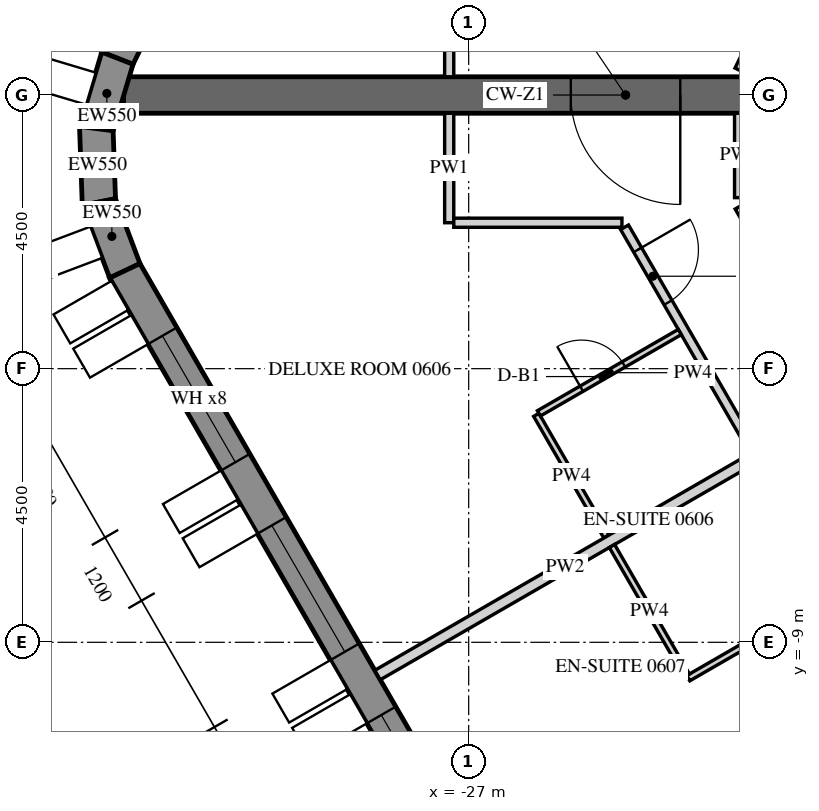
"""IFC4 building model, lengths in metres.
Left out: names, types, materials, properties, quantities, classifications, styles, units other than length and angle.
Written with IfcOpenShell. Run it as: python <this file> out.ifc"""

import sys

from ifc_helpers import new_model, si_unit, direction, frame, frame_2d, origin, place, context, subcontext, project, spatial, polyline, rectangle, outline, extrude, element, fill, save


model = new_model("IFC4")
c1 = context("Model", 3, precision=1e-05, world=origin(), true_north=direction((0.0, 1.0)))
c2 = subcontext(c1, "Body", "Model", "MODEL_VIEW")
j1 = project(units=[si_unit("LENGTHUNIT", "METRE"), si_unit("PLANEANGLEUNIT", "RADIAN")], contexts=[c1])
p1 = place(None, origin())
s1 = spatial("IfcSite", under=j1, at=p1, CompositionType="ELEMENT")
p2 = place(p1, origin())
s2 = spatial("IfcBuilding", under=s1, at=p2, CompositionType="ELEMENT")
p3 = place(p2, frame((0.0, 0.0, 92.1)))
s3 = spatial("IfcBuildingStorey", under=s2, at=p3, CompositionType="ELEMENT", Elevation=92.1)
p4 = place(p3, frame((-19.595, 27.633, -0.15), z_axis=(0.0, 0.0, 1.0), x_axis=(-0.438368285794, -0.898795441694, 0.0)))
e1 = element("IfcWall", 1, at=p4, inside=s3, PredefinedType="SOLIDWALL", context=c2, shape_type="SweptSolid", body=[
    extrude(outline(polyline([(-0.026, -0.275), (30.093, -0.275), (30.048, 0.275), (0.026, 0.275), (-0.026, -0.275)])), origin(), (0.0, 0.0, 1.0), 3.9),
])
p5 = place(p4, frame((1.236, 0.0, 1.05)))
e2 = element("IfcOpeningElement", 2, at=p5, cuts=e1, PredefinedType="OPENING", context=c2, shape_type="SweptSolid", body=[
    extrude(rectangle(XDim=2.4, YDim=2.4, at=frame_2d((1.2, 1.2))), frame((0.0, 0.285, 0.0), z_axis=(0.0, -1.0, 0.0), x_axis=(1.0, 0.0, 0.0)), (0.0, 0.0, 1.0), 0.57),
])
p6 = place(p4, frame((4.835, 0.0, 1.05)))
e3 = element("IfcOpeningElement", 3, at=p6, cuts=e1, PredefinedType="OPENING", context=c2, shape_type="SweptSolid", body=[
    extrude(rectangle(XDim=2.4, YDim=2.4, at=frame_2d((1.2, 1.2))), frame((0.0, 0.285, 0.0), z_axis=(0.0, -1.0, 0.0), x_axis=(1.0, 0.0, 0.0)), (0.0, 0.0, 1.0), 0.57),
])
p7 = place(p4, frame((8.436, 0.0, 1.05)))
e4 = element("IfcOpeningElement", 4, at=p7, cuts=e1, PredefinedType="OPENING", context=c2, shape_type="SweptSolid", body=[
    extrude(rectangle(XDim=2.4, YDim=2.4, at=frame_2d((1.2, 1.2))), frame((0.0, 0.285, 0.0), z_axis=(0.0, -1.0, 0.0), x_axis=(1.0, 0.0, 0.0)), (0.0, 0.0, 1.0), 0.57),
])
p8 = place(p4, frame((12.035, 0.0, 1.05)))
e5 = element("IfcOpeningElement", 5, at=p8, cuts=e1, PredefinedType="OPENING", context=c2, shape_type="SweptSolid", body=[
    extrude(rectangle(XDim=2.4, YDim=2.4, at=frame_2d((1.2, 1.2))), frame((0.0, 0.285, 0.0), z_axis=(0.0, -1.0, 0.0), x_axis=(1.0, 0.0, 0.0)), (0.0, 0.0, 1.0), 0.57),
])
p9 = place(p4, frame((15.635, 0.0, 1.05)))
e6 = element("IfcOpeningElement", 6, at=p9, cuts=e1, PredefinedType="OPENING", context=c2, shape_type="SweptSolid", body=[
    extrude(rectangle(XDim=2.4, YDim=2.4, at=frame_2d((1.2, 1.2))), frame((0.0, 0.285, 0.0), z_axis=(0.0, -1.0, 0.0), x_axis=(1.0, 0.0, 0.0)), (0.0, 0.0, 1.0), 0.57),
])
p10 = place(p4, frame((19.236, 0.0, 1.05)))
e7 = element("IfcOpeningElement", 7, at=p10, cuts=e1, PredefinedType="OPENING", context=c2, shape_type="SweptSolid", body=[
    extrude(rectangle(XDim=2.4, YDim=2.4, at=frame_2d((1.2, 1.2))), frame((0.0, 0.285, 0.0), z_axis=(0.0, -1.0, 0.0), x_axis=(1.0, 0.0, 0.0)), (0.0, 0.0, 1.0), 0.57),
])
p11 = place(p4, frame((22.835, 0.0, 1.05)))
e8 = element("IfcOpeningElement", 8, at=p11, cuts=e1, PredefinedType="OPENING", context=c2, shape_type="SweptSolid", body=[
    extrude(rectangle(XDim=2.4, YDim=2.4, at=frame_2d((1.2, 1.2))), frame((0.0, 0.285, 0.0), z_axis=(0.0, -1.0, 0.0), x_axis=(1.0, 0.0, 0.0)), (0.0, 0.0, 1.0), 0.57),
])
p12 = place(p4, frame((26.436, 0.0, 1.05)))
e9 = element("IfcOpeningElement", 9, at=p12, cuts=e1, PredefinedType="OPENING", context=c2, shape_type="SweptSolid", body=[
    extrude(rectangle(XDim=2.4, YDim=2.4, at=frame_2d((1.2, 1.2))), frame((0.0, 0.285, 0.0), z_axis=(0.0, -1.0, 0.0), x_axis=(1.0, 0.0, 0.0)), (0.0, 0.0, 1.0), 0.57),
])
p13 = place(p3, frame((-32.777, 0.605, -0.15), z_axis=(0.0, 0.0, 1.0), x_axis=(-0.286921497463, -0.957954098219, 0.0)))
e10 = element("IfcWall", 10, at=p13, inside=s3, PredefinedType="SOLIDWALL", context=c2, shape_type="SweptSolid", body=[
    extrude(outline(polyline([(-0.022, -0.275), (1.253, -0.275), (1.163, 0.275), (0.022, 0.275), (-0.022, -0.275)])), origin(), (0.0, 0.0, 1.0), 3.9),
])
p14 = place(p3, frame((-33.124, -0.552, -0.15), z_axis=(0.0, 0.0, 1.0), x_axis=(0.03495638276, -0.999388838893, 0.0)))
e11 = element("IfcWall", 11, at=p14, inside=s3, PredefinedType="SOLIDWALL", context=c2, shape_type="SweptSolid", body=[
    extrude(outline(polyline([(-0.045, -0.275), (1.253, -0.275), (1.163, 0.275), (0.045, 0.275), (-0.045, -0.275)])), origin(), (0.0, 0.0, 1.0), 3.9),
])
p15 = place(p3, frame((-33.081, -1.76, -0.15), z_axis=(0.0, 0.0, 1.0), x_axis=(0.353027214741, -0.935613053378, 0.0)))
e12 = element("IfcWall", 12, at=p15, inside=s3, PredefinedType="SOLIDWALL", context=c2, shape_type="SweptSolid", body=[
    extrude(outline(polyline([(-0.045, -0.275), (1.231, -0.275), (1.186, 0.275), (0.045, 0.275), (-0.045, -0.275)])), origin(), (0.0, 0.0, 1.0), 3.9),
])
p16 = place(p3, frame((-32.655, -2.89, -0.15), z_axis=(0.0, 0.0, 1.0), x_axis=(0.499997711317, -0.866026725152, 0.0)))
e13 = element("IfcWall", 13, at=p16, inside=s3, PredefinedType="SOLIDWALL", context=c2, shape_type="SweptSolid", body=[
    extrude(outline(polyline([(-0.022, -0.275), (30.097, -0.275), (30.045, 0.275), (0.022, 0.275), (-0.022, -0.275)])), origin(), (0.0, 0.0, 1.0), 3.9),
])
p17 = place(p16, frame((1.236, 0.0, 1.05)))
e14 = element("IfcOpeningElement", 14, at=p17, cuts=e13, PredefinedType="OPENING", context=c2, shape_type="SweptSolid", body=[
    extrude(rectangle(XDim=2.4, YDim=2.4, at=frame_2d((1.2, 1.2))), frame((0.0, 0.285, 0.0), z_axis=(0.0, -1.0, 0.0), x_axis=(1.0, 0.0, 0.0)), (0.0, 0.0, 1.0), 0.57),
])
p18 = place(p16, frame((4.835, 0.0, 1.05)))
e15 = element("IfcOpeningElement", 15, at=p18, cuts=e13, PredefinedType="OPENING", context=c2, shape_type="SweptSolid", body=[
    extrude(rectangle(XDim=2.4, YDim=2.4, at=frame_2d((1.2, 1.2))), frame((0.0, 0.285, 0.0), z_axis=(0.0, -1.0, 0.0), x_axis=(1.0, 0.0, 0.0)), (0.0, 0.0, 1.0), 0.57),
])
p19 = place(p16, frame((8.436, 0.0, 1.05)))
e16 = element("IfcOpeningElement", 16, at=p19, cuts=e13, PredefinedType="OPENING", context=c2, shape_type="SweptSolid", body=[
    extrude(rectangle(XDim=2.4, YDim=2.4, at=frame_2d((1.2, 1.2))), frame((0.0, 0.285, 0.0), z_axis=(0.0, -1.0, 0.0), x_axis=(1.0, 0.0, 0.0)), (0.0, 0.0, 1.0), 0.57),
])
p20 = place(p16, frame((12.035, 0.0, 1.05)))
e17 = element("IfcOpeningElement", 17, at=p20, cuts=e13, PredefinedType="OPENING", context=c2, shape_type="SweptSolid", body=[
    extrude(rectangle(XDim=2.4, YDim=2.4, at=frame_2d((1.2, 1.2))), frame((0.0, 0.285, 0.0), z_axis=(0.0, -1.0, 0.0), x_axis=(1.0, 0.0, 0.0)), (0.0, 0.0, 1.0), 0.57),
])
p21 = place(p16, frame((15.635, 0.0, 1.05)))
e18 = element("IfcOpeningElement", 18, at=p21, cuts=e13, PredefinedType="OPENING", context=c2, shape_type="SweptSolid", body=[
    extrude(rectangle(XDim=2.4, YDim=2.4, at=frame_2d((1.2, 1.2))), frame((0.0, 0.285, 0.0), z_axis=(0.0, -1.0, 0.0), x_axis=(1.0, 0.0, 0.0)), (0.0, 0.0, 1.0), 0.57),
])
p22 = place(p16, frame((19.236, 0.0, 1.05)))
e19 = element("IfcOpeningElement", 19, at=p22, cuts=e13, PredefinedType="OPENING", context=c2, shape_type="SweptSolid", body=[
    extrude(rectangle(XDim=2.4, YDim=2.4, at=frame_2d((1.2, 1.2))), frame((0.0, 0.285, 0.0), z_axis=(0.0, -1.0, 0.0), x_axis=(1.0, 0.0, 0.0)), (0.0, 0.0, 1.0), 0.57),
])
p23 = place(p16, frame((22.835, 0.0, 1.05)))
e20 = element("IfcOpeningElement", 20, at=p23, cuts=e13, PredefinedType="OPENING", context=c2, shape_type="SweptSolid", body=[
    extrude(rectangle(XDim=2.4, YDim=2.4, at=frame_2d((1.2, 1.2))), frame((0.0, 0.285, 0.0), z_axis=(0.0, -1.0, 0.0), x_axis=(1.0, 0.0, 0.0)), (0.0, 0.0, 1.0), 0.57),
])
p24 = place(p16, frame((26.436, 0.0, 1.05)))
e21 = element("IfcOpeningElement", 21, at=p24, cuts=e13, PredefinedType="OPENING", context=c2, shape_type="SweptSolid", body=[
    extrude(rectangle(XDim=2.4, YDim=2.4, at=frame_2d((1.2, 1.2))), frame((0.0, 0.285, 0.0), z_axis=(0.0, -1.0, 0.0), x_axis=(1.0, 0.0, 0.0)), (0.0, 0.0, 1.0), 0.57),
])
p25 = place(p3, frame((-16.166, 0.0, -0.15), z_axis=(0.0, 0.0, 1.0), x_axis=(-1.0, 0.0, 0.0)))
e22 = element("IfcWall", 22, at=p25, inside=s3, PredefinedType="SHEAR", context=c2, shape_type="SweptSolid", body=[
    extrude(rectangle(XDim=16.509, YDim=0.6, at=frame_2d((8.254, 0.0))), origin(), (0.0, 0.0, 1.0), 3.9),
])
p26 = place(p25, frame((7.354, 0.0, 0.15)))
e23 = element("IfcOpeningElement", 23, at=p26, cuts=e22, PredefinedType="OPENING", context=c2, shape_type="SweptSolid", body=[
    extrude(rectangle(XDim=1.8, YDim=2.4, at=frame_2d((0.9, 1.2))), frame((0.0, 0.31, 0.0), z_axis=(0.0, -1.0, 0.0), x_axis=(1.0, 0.0, 0.0)), (0.0, 0.0, 1.0), 0.62),
])
p27 = place(p3, frame((-27.32, 2.025, 0.0), z_axis=(0.0, 0.0, 1.0), x_axis=(0.0, -1.0, 0.0)))
e24 = element("IfcWall", 24, at=p27, inside=s3, PredefinedType="PARTITIONING", context=c2, shape_type="SweptSolid", body=[
    extrude(rectangle(XDim=1.725, YDim=0.15, at=frame_2d((0.862, 0.0))), origin(), (0.0, 0.0, 1.0), 2.988),
])
p28 = place(p3, frame((-22.553, 0.41, 0.0), z_axis=(0.0, 0.0, 1.0), x_axis=(0.438382679221, 0.898788421465, 0.0)))
e25 = element("IfcWall", 25, at=p28, inside=s3, PredefinedType="PARTITIONING", context=c2, shape_type="SweptSolid", body=[
    extrude(rectangle(XDim=9.866, YDim=0.15, at=frame_2d((4.933, 0.0))), origin(), (0.0, 0.0, 1.0), 2.988),
])
p29 = place(p28, frame((4.483, 0.0, 0.0)))
e26 = element("IfcOpeningElement", 26, at=p29, cuts=e25, PredefinedType="OPENING", context=c2, shape_type="SweptSolid", body=[
    extrude(rectangle(XDim=0.9, YDim=2.1, at=frame_2d((0.45, 1.05))), frame((0.0, 0.085, 0.0), z_axis=(0.0, -1.0, 0.0), x_axis=(1.0, 0.0, 0.0)), (0.0, 0.0, 1.0), 0.17),
])
p30 = place(p3, frame((-27.32, -0.3, 0.0), z_axis=(0.0, 0.0, 1.0), x_axis=(0.0, -1.0, 0.0)))
e27 = element("IfcWall", 27, at=p30, inside=s3, PredefinedType="PARTITIONING", context=c2, shape_type="SweptSolid", body=[
    extrude(rectangle(XDim=1.8, YDim=0.15, at=frame_2d((0.9, 0.0))), origin(), (0.0, 0.0, 1.0), 2.988),
])
p31 = place(p3, frame((-27.245, -2.1, 0.0), z_axis=(0.0, 0.0, 1.0), x_axis=(1.0, 0.0, 0.0)))
e28 = element("IfcWall", 28, at=p31, inside=s3, PredefinedType="PARTITIONING", context=c2, shape_type="SweptSolid", body=[
    extrude(rectangle(XDim=2.766, YDim=0.15, at=frame_2d((1.383, 0.0))), origin(), (0.0, 0.0, 1.0), 2.988),
])
p32 = place(p3, frame((-24.436, -2.175, 0.0), z_axis=(0.0, 0.0, 1.0), x_axis=(0.499996816197, -0.866027241946, 0.0)))
e29 = element("IfcWall", 29, at=p32, inside=s3, PredefinedType="PARTITIONING", context=c2, shape_type="SweptSolid", body=[
    extrude(rectangle(XDim=24.238, YDim=0.15, at=frame_2d((12.119, 0.0))), origin(), (0.0, 0.0, 1.0), 2.988),
])
p33 = place(p32, frame((0.429, 0.0, 0.0)))
e30 = element("IfcOpeningElement", 30, at=p33, cuts=e29, PredefinedType="OPENING", context=c2, shape_type="SweptSolid", body=[
    extrude(rectangle(XDim=1.0, YDim=2.1, at=frame_2d((0.5, 1.05))), frame((0.0, 0.085, 0.0), z_axis=(0.0, -1.0, 0.0), x_axis=(1.0, 0.0, 0.0)), (0.0, 0.0, 1.0), 0.17),
])
p34 = place(p32, frame((12.346, 0.0, 0.0)))
e31 = element("IfcOpeningElement", 31, at=p34, cuts=e29, PredefinedType="OPENING", context=c2, shape_type="SweptSolid", body=[
    extrude(rectangle(XDim=1.0, YDim=2.1, at=frame_2d((0.5, 1.05))), frame((0.0, 0.085, 0.0), z_axis=(0.0, -1.0, 0.0), x_axis=(1.0, 0.0, 0.0)), (0.0, 0.0, 1.0), 0.17),
])
p35 = place(p32, frame((22.292, 0.0, 0.0)))
e32 = element("IfcOpeningElement", 32, at=p35, cuts=e29, PredefinedType="OPENING", context=c2, shape_type="SweptSolid", body=[
    extrude(rectangle(XDim=1.0, YDim=2.1, at=frame_2d((0.5, 1.05))), frame((0.0, 0.085, 0.0), z_axis=(0.0, -1.0, 0.0), x_axis=(1.0, 0.0, 0.0)), (0.0, 0.0, 1.0), 0.17),
])
p36 = place(p3, frame((-18.287, -9.226, 0.0), z_axis=(0.0, 0.0, 1.0), x_axis=(-0.500004853958, 0.866022601332, 0.0)))
e33 = element("IfcWall", 33, at=p36, inside=s3, PredefinedType="PARTITIONING", context=c2, shape_type="SweptSolid", body=[
    extrude(rectangle(XDim=8.531, YDim=0.15, at=frame_2d((4.266, 0.0))), origin(), (0.0, 0.0, 1.0), 2.988),
])
p37 = place(p36, frame((3.816, 0.0, 0.0)))
e34 = element("IfcOpeningElement", 34, at=p37, cuts=e33, PredefinedType="OPENING", context=c2, shape_type="SweptSolid", body=[
    extrude(rectangle(XDim=0.9, YDim=2.1, at=frame_2d((0.45, 1.05))), frame((0.0, 0.085, 0.0), z_axis=(0.0, -1.0, 0.0), x_axis=(1.0, 0.0, 0.0)), (0.0, 0.0, 1.0), 0.17),
])
p38 = place(p3, frame((-22.553, -1.688, 0.0), z_axis=(0.0, 0.0, 1.0), x_axis=(0.0, 1.0, 0.0)))
e35 = element("IfcWall", 35, at=p38, inside=s3, PredefinedType="PARTITIONING", context=c2, shape_type="SweptSolid", body=[
    extrude(rectangle(XDim=1.387, YDim=0.15, at=frame_2d((0.694, 0.0))), origin(), (0.0, 0.0, 1.0), 2.988),
])
p39 = place(p3, frame((-24.733, -7.26, 0.0), z_axis=(0.0, 0.0, 1.0), x_axis=(-0.500015210774, 0.866016621662, 0.0)))
e36 = element("IfcWall", 36, at=p39, inside=s3, PredefinedType="PARTITIONING", context=c2, shape_type="SweptSolid", body=[
    extrude(rectangle(XDim=2.31, YDim=0.1, at=frame_2d((1.155, 0.0))), origin(), (0.0, 0.0, 1.0), 2.988),
])
p40 = place(p3, frame((-25.845, -5.235, 0.0), z_axis=(0.0, 0.0, 1.0), x_axis=(0.86604424267, 0.499967368674, 0.0)))
e37 = element("IfcWall", 37, at=p40, inside=s3, PredefinedType="PARTITIONING", context=c2, shape_type="SweptSolid", body=[
    extrude(rectangle(XDim=2.675, YDim=0.1, at=frame_2d((1.337, 0.0))), origin(), (0.0, 0.0, 1.0), 2.988),
])
p41 = place(p40, frame((0.81, 0.0, 0.0)))
e38 = element("IfcOpeningElement", 38, at=p41, cuts=e37, PredefinedType="OPENING", context=c2, shape_type="SweptSolid", body=[
    extrude(rectangle(XDim=0.8, YDim=2.1, at=frame_2d((0.4, 1.05))), frame((0.0, 0.06, 0.0), z_axis=(0.0, -1.0, 0.0), x_axis=(1.0, 0.0, 0.0)), (0.0, 0.0, 1.0), 0.12),
])
p42 = place(p3, frame((-28.499, -9.538, 0.0), z_axis=(0.0, 0.0, 1.0), x_axis=(0.866024672353, 0.500001266874, 0.0)))
e39 = element("IfcWall", 39, at=p42, inside=s3, PredefinedType="PARTITIONING", context=c2, shape_type="SweptSolid", body=[
    extrude(rectangle(XDim=7.125, YDim=0.18, at=frame_2d((3.562, 0.0))), origin(), (0.0, 0.0, 1.0), 2.988),
])
p43 = place(p3, frame((-21.029, -8.228, 0.0), z_axis=(0.0, 0.0, 1.0), x_axis=(-0.866012511928, -0.500022328685, 0.0)))
e40 = element("IfcWall", 40, at=p43, inside=s3, PredefinedType="PARTITIONING", context=c2, shape_type="SweptSolid", body=[
    extrude(rectangle(XDim=2.725, YDim=0.1, at=frame_2d((1.363, 0.0))), origin(), (0.0, 0.0, 1.0), 2.988),
])
p44 = place(p43, frame((0.925, 0.0, 0.0)))
e41 = element("IfcOpeningElement", 41, at=p44, cuts=e40, PredefinedType="OPENING", context=c2, shape_type="SweptSolid", body=[
    extrude(rectangle(XDim=0.8, YDim=2.1, at=frame_2d((0.4, 1.05))), frame((0.0, 0.06, 0.0), z_axis=(0.0, -1.0, 0.0), x_axis=(1.0, 0.0, 0.0)), (0.0, 0.0, 1.0), 0.12),
])
p45 = place(p3, frame((-23.413, -9.547, 0.0), z_axis=(0.0, 0.0, 1.0), x_axis=(-0.499960120811, 0.86604842682, 0.0)))
e42 = element("IfcWall", 42, at=p45, inside=s3, PredefinedType="PARTITIONING", context=c2, shape_type="SweptSolid", body=[
    extrude(rectangle(XDim=2.46, YDim=0.1, at=frame_2d((1.23, 0.0))), origin(), (0.0, 0.0, 1.0), 2.988),
])
p46 = place(p17, frame((0.0, 0.205, 0.0)))
e43 = element("IfcWindow", 43, at=p46, inside=s3, PartitioningType="DOUBLE_PANEL_VERTICAL", PredefinedType="WINDOW", context=c2, shape_type="SweptSolid", body=[
    extrude(rectangle(XDim=2.4, YDim=2.4, at=frame_2d((1.2, 1.2))), frame((0.0, 0.03, 0.0), z_axis=(0.0, -1.0, 0.0), x_axis=(1.0, 0.0, 0.0)), (0.0, 0.0, 1.0), 0.06),
])
fill(e14, e43)
p47 = place(p18, frame((0.0, 0.205, 0.0)))
e44 = element("IfcWindow", 44, at=p47, inside=s3, PartitioningType="DOUBLE_PANEL_VERTICAL", PredefinedType="WINDOW", context=c2, shape_type="SweptSolid", body=[
    extrude(rectangle(XDim=2.4, YDim=2.4, at=frame_2d((1.2, 1.2))), frame((0.0, 0.03, 0.0), z_axis=(0.0, -1.0, 0.0), x_axis=(1.0, 0.0, 0.0)), (0.0, 0.0, 1.0), 0.06),
])
fill(e15, e44)
p48 = place(p19, frame((0.0, 0.205, 0.0)))
e45 = element("IfcWindow", 45, at=p48, inside=s3, PartitioningType="DOUBLE_PANEL_VERTICAL", PredefinedType="WINDOW", context=c2, shape_type="SweptSolid", body=[
    extrude(rectangle(XDim=2.4, YDim=2.4, at=frame_2d((1.2, 1.2))), frame((0.0, 0.03, 0.0), z_axis=(0.0, -1.0, 0.0), x_axis=(1.0, 0.0, 0.0)), (0.0, 0.0, 1.0), 0.06),
])
fill(e16, e45)
p49 = place(p26, origin())
e46 = element("IfcDoor", 46, at=p49, inside=s3, OperationType="DOUBLE_DOOR_SINGLE_SWING", PredefinedType="DOOR", context=c2, shape_type="SweptSolid", body=[
    extrude(rectangle(XDim=1.8, YDim=2.4, at=frame_2d((0.9, 1.2))), frame((0.0, 0.025, 0.0), z_axis=(0.0, -1.0, 0.0), x_axis=(1.0, 0.0, 0.0)), (0.0, 0.0, 1.0), 0.05),
])
fill(e23, e46)
p50 = place(p33, origin())
e47 = element("IfcDoor", 47, at=p50, inside=s3, OperationType="SINGLE_SWING_RIGHT", PredefinedType="DOOR", context=c2, shape_type="SweptSolid", body=[
    extrude(rectangle(XDim=1.0, YDim=2.1, at=frame_2d((0.5, 1.05))), frame((0.0, 0.025, 0.0), z_axis=(0.0, -1.0, 0.0), x_axis=(1.0, 0.0, 0.0)), (0.0, 0.0, 1.0), 0.05),
])
fill(e30, e47)
p51 = place(p41, origin())
e48 = element("IfcDoor", 48, at=p51, inside=s3, OperationType="SINGLE_SWING_RIGHT", PredefinedType="DOOR", context=c2, shape_type="SweptSolid", body=[
    extrude(rectangle(XDim=0.8, YDim=2.1, at=frame_2d((0.4, 1.05))), frame((0.0, 0.025, 0.0), z_axis=(0.0, -1.0, 0.0), x_axis=(1.0, 0.0, 0.0)), (0.0, 0.0, 1.0), 0.05),
])
fill(e38, e48)
save(model, sys.argv[1])
